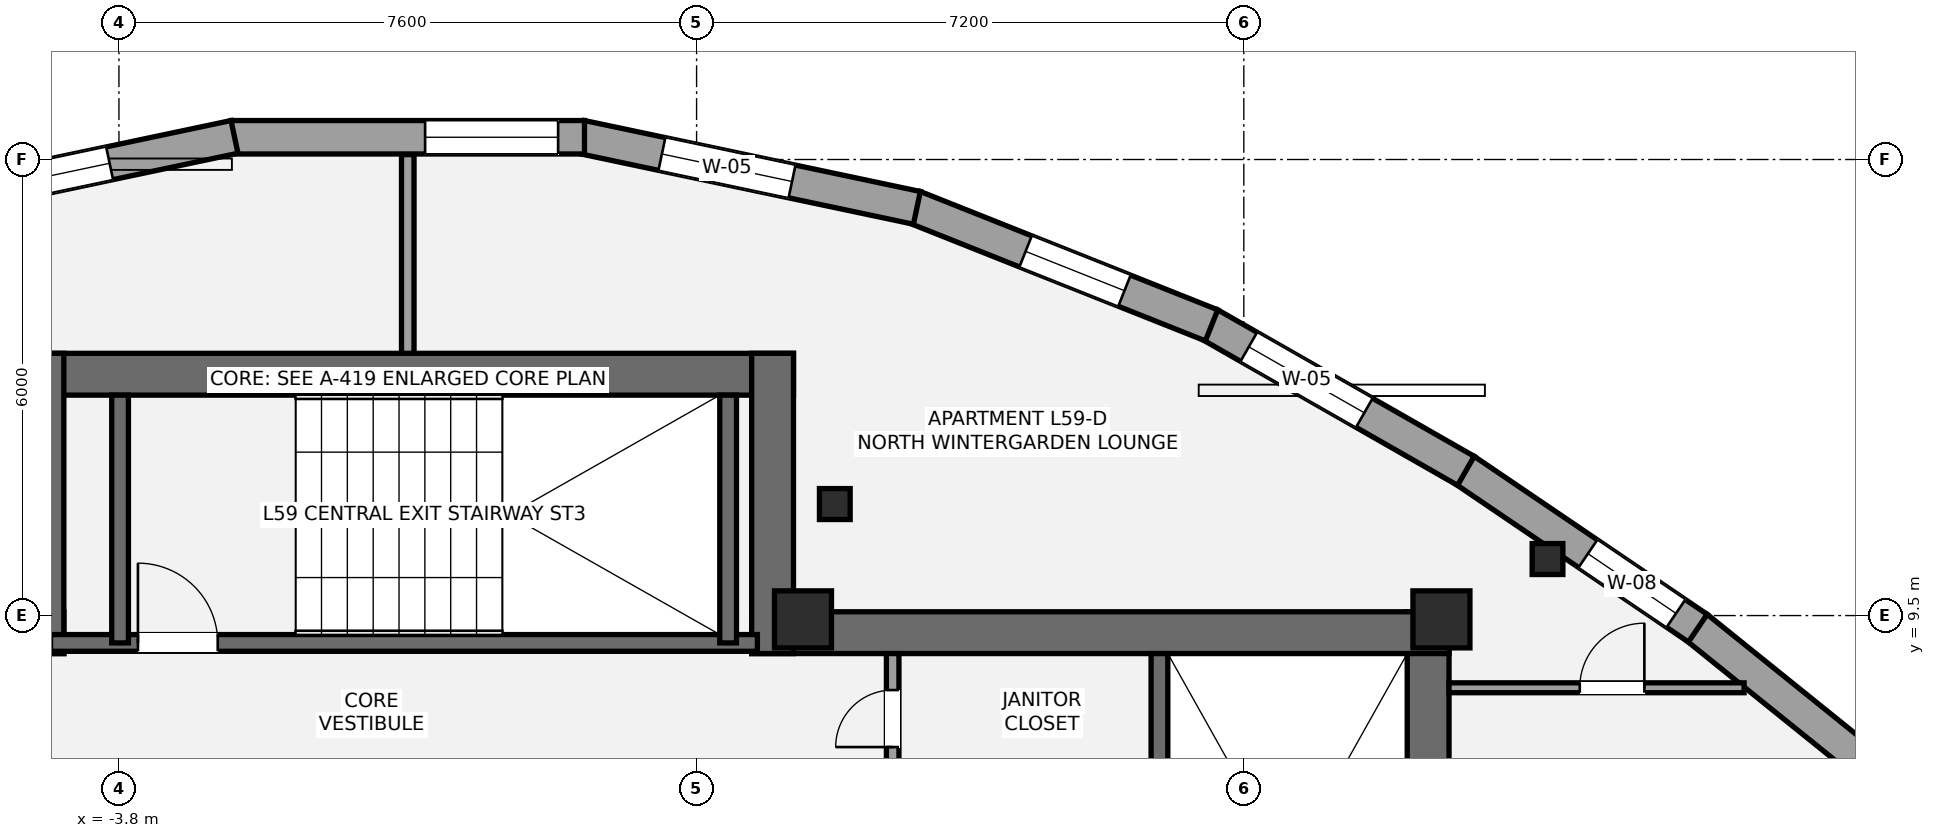
"""IFC4 building model, lengths in metres.
Left out: names, types, materials, properties, quantities, classifications, styles, units other than length and angle.
Written with IfcOpenShell. Run it as: python <this file> out.ifc"""

import sys

from ifc_helpers import new_model, si_unit, direction, frame, frame_2d, origin, origin_2d, place, context, subcontext, project, spatial, rectangle, i_section, extrude, element, fill, save


model = new_model("IFC4")
c1 = context("Model", 3, precision=1e-05, world=origin(), true_north=direction((0.0, 1.0)))
c2 = subcontext(c1, "Body", "Model", "MODEL_VIEW")
j1 = project(units=[si_unit("LENGTHUNIT", "METRE"), si_unit("PLANEANGLEUNIT", "RADIAN")], contexts=[c1])
p1 = place(None, origin())
s1 = spatial("IfcSite", under=j1, at=p1, CompositionType="ELEMENT")
p2 = place(p1, origin())
s2 = spatial("IfcBuilding", under=s1, at=p2, CompositionType="ELEMENT")
p3 = place(p2, frame((0.0, 0.0, 213.15)))
s3 = spatial("IfcBuildingStorey", under=s2, at=p3, CompositionType="ELEMENT", Elevation=213.15)
p4 = place(p3, frame((-13.7, 9.275, 0.0), z_axis=(0.0, 0.0, 1.0), x_axis=(1.0, 0.0, 0.0)))
e1 = element("IfcWall", 1, at=p4, inside=s3, PredefinedType="SHEAR", context=c2, shape_type="SweptSolid", body=[
    extrude(rectangle(XDim=9.175, YDim=0.55, at=frame_2d((4.587, 0.0))), origin(), (0.0, 0.0, 1.0), 3.15),
])
p5 = place(p3, frame((13.425, 1.3, 0.0), z_axis=(0.0, 0.0, 1.0), x_axis=(0.0, 1.0, 0.0)))
e2 = element("IfcWall", 2, at=p5, inside=s3, PredefinedType="SHEAR", context=c2, shape_type="SweptSolid", body=[
    extrude(rectangle(XDim=8.25, YDim=0.55, at=frame_2d((4.125, 0.0))), origin(), (0.0, 0.0, 1.0), 3.15),
])
p6 = place(p3, frame((4.525, 9.275, 0.0), z_axis=(0.0, 0.0, 1.0), x_axis=(1.0, 0.0, 0.0)))
e3 = element("IfcWall", 3, at=p6, inside=s3, PredefinedType="SHEAR", context=c2, shape_type="SweptSolid", body=[
    extrude(rectangle(XDim=9.175, YDim=0.55, at=frame_2d((4.587, 0.0))), origin(), (0.0, 0.0, 1.0), 3.15),
])
p7 = place(p3, frame((9.89, 1.85, 0.0), z_axis=(0.0, 0.0, 1.0), x_axis=(0.0, 1.0, 0.0)))
e4 = element("IfcWall", 4, at=p7, inside=s3, PredefinedType="SHEAR", context=c2, shape_type="SweptSolid", body=[
    extrude(rectangle(XDim=7.15, YDim=0.22, at=frame_2d((3.575, 0.0))), origin(), (0.0, 0.0, 1.0), 3.15),
])
p8 = place(p3, frame((-5.075, 12.675, 0.0), z_axis=(0.0, 0.0, 1.0), x_axis=(1.0, 0.0, 0.0)))
e5 = element("IfcWall", 5, at=p8, inside=s3, PredefinedType="SHEAR", context=c2, shape_type="SweptSolid", body=[
    extrude(rectangle(XDim=10.15, YDim=0.55, at=frame_2d((5.075, 0.0))), origin(), (0.0, 0.0, 1.0), 3.15),
])
for number, where, z_axis, x_axis in (
    (6, (-4.8, 9.0, 0.0), (0.0, 0.0, 1.0), (0.0, 1.0, 0.0)),
    (7, (4.8, 9.0, 0.0), (0.0, 0.0, 1.0), (0.0, 1.0, 0.0)),
):
    element("IfcWall", number, at=place(p3, frame(where, z_axis=z_axis, x_axis=x_axis)), inside=s3, PredefinedType="SHEAR", context=c2, shape_type="SweptSolid", body=[
        extrude(rectangle(XDim=3.95, YDim=0.55, at=frame_2d((1.975, 0.0))), origin(), (0.0, 0.0, 1.0), 3.15),
    ])
p9 = place(p3, frame((-4.7, 9.14, 0.0), z_axis=(0.0, 0.0, 1.0), x_axis=(1.0, 0.0, 0.0)))
e8 = element("IfcWall", 8, at=p9, inside=s3, PredefinedType="SHEAR", context=c2, shape_type="SweptSolid", body=[
    extrude(rectangle(XDim=9.3, YDim=0.22, at=frame_2d((4.65, 0.0))), origin(), (0.0, 0.0, 1.0), 3.15),
])
p10 = place(p9, frame((1.15, 0.0, 0.0)))
e9 = element("IfcOpeningElement", 9, at=p10, cuts=e8, PredefinedType="OPENING", context=c2, shape_type="SweptSolid", body=[
    extrude(rectangle(XDim=1.05, YDim=2.15, at=frame_2d((0.525, 1.075))), frame((0.0, 0.12, 0.0), z_axis=(0.0, -1.0, 0.0), x_axis=(1.0, 0.0, 0.0)), (0.0, 0.0, 1.0), 0.24),
])
for number, where, z_axis, x_axis in (
    (10, (-3.785, 9.14, 0.0), (0.0, 0.0, 1.0), (0.0, 1.0, 0.0)),
    (11, (4.215, 9.14, 0.0), (0.0, 0.0, 1.0), (0.0, 1.0, 0.0)),
):
    element("IfcWall", number, at=place(p3, frame(where, z_axis=z_axis, x_axis=x_axis)), inside=s3, PredefinedType="SHEAR", context=c2, shape_type="SweptSolid", body=[
        extrude(rectangle(XDim=3.26, YDim=0.22, at=frame_2d((1.63, 0.0))), origin(), (0.0, 0.0, 1.0), 3.15),
    ])
for number, where, z_axis, x_axis in (
    (12, (5.2, 9.45, 0.0), (0.0, 0.0, 1.0), (1.0, 0.0, 0.0)),
    (13, (13.6, 9.45, 0.0), (0.0, 0.0, 1.0), (1.0, 0.0, 0.0)),
):
    element("IfcColumn", number, at=place(p3, frame(where, z_axis=z_axis, x_axis=x_axis)), inside=s3, PredefinedType="PILASTER", context=c2, shape_type="SweptSolid", body=[
        extrude(rectangle(XDim=0.75, YDim=0.75, at=origin_2d()), origin(), (0.0, 0.0, 1.0), 3.15),
    ])
for number, where, z_axis, x_axis in (
    (14, (14.996, 10.244, 0.0), (0.0, 0.0, 1.0), (1.0, 0.0, 0.0)),
    (15, (5.619, 10.967, 0.0), (0.0, 0.0, 1.0), (1.0, 0.0, 0.0)),
):
    element("IfcColumn", number, at=place(p3, frame(where, z_axis=z_axis, x_axis=x_axis)), inside=s3, PredefinedType="COLUMN", context=c2, shape_type="SweptSolid", body=[
        extrude(i_section(OverallWidth=0.404, OverallDepth=0.407, WebThickness=0.027, FlangeThickness=0.044, at=origin_2d()), origin(), (0.0, 0.0, 1.0), 3.15),
    ])
p11 = place(p3, frame((16.958, 9.345, 0.0), z_axis=(0.0, 0.0, 1.0), x_axis=(0.778794775864, -0.627278803314, 0.0)))
e16 = element("IfcWall", 16, at=p11, inside=s3, PredefinedType="STANDARD", context=c2, shape_type="SweptSolid", body=[
    extrude(rectangle(XDim=3.648, YDim=0.44, at=frame_2d((1.824, 0.0))), origin(), (0.0, 0.0, 1.0), 2.336),
])
p12 = place(p3, frame((13.907, 11.413, 0.0), z_axis=(0.0, 0.0, 1.0), x_axis=(0.827592777121, -0.561328954586, 0.0)))
e17 = element("IfcWall", 17, at=p12, inside=s3, PredefinedType="STANDARD", context=c2, shape_type="SweptSolid", body=[
    extrude(rectangle(XDim=3.704, YDim=0.44, at=frame_2d((1.852, 0.0))), origin(), (0.0, 0.0, 1.0), 2.336),
])
p13 = place(p12, frame((1.958, 0.0, 0.58)))
e18 = element("IfcOpeningElement", 18, at=p13, cuts=e17, PredefinedType="OPENING", context=c2, shape_type="SweptSolid", body=[
    extrude(rectangle(XDim=1.4, YDim=1.55, at=frame_2d((0.7, 0.775))), frame((0.0, 0.23, 0.0), z_axis=(0.0, -1.0, 0.0), x_axis=(1.0, 0.0, 0.0)), (0.0, 0.0, 1.0), 0.46),
])
p14 = place(p3, frame((10.548, 13.332, 0.0), z_axis=(0.0, 0.0, 1.0), x_axis=(0.868339797426, -0.495969753317, 0.0)))
e19 = element("IfcWall", 19, at=p14, inside=s3, PredefinedType="STANDARD", context=c2, shape_type="SweptSolid", body=[
    extrude(rectangle(XDim=3.885, YDim=0.44, at=frame_2d((1.943, 0.0))), origin(), (0.0, 0.0, 1.0), 2.336),
])
p15 = place(p14, frame((0.597, 0.0, 0.55)))
e20 = element("IfcOpeningElement", 20, at=p15, cuts=e19, PredefinedType="OPENING", context=c2, shape_type="SweptSolid", body=[
    extrude(rectangle(XDim=1.75, YDim=1.55, at=frame_2d((0.875, 0.775))), frame((0.0, 0.23, 0.0), z_axis=(0.0, -1.0, 0.0), x_axis=(1.0, 0.0, 0.0)), (0.0, 0.0, 1.0), 0.46),
])
p16 = place(p3, frame((6.663, 14.875, 0.0), z_axis=(0.0, 0.0, 1.0), x_axis=(0.929170765931, -0.369650764558, 0.0)))
e21 = element("IfcWall", 21, at=p16, inside=s3, PredefinedType="STANDARD", context=c2, shape_type="SweptSolid", body=[
    extrude(rectangle(XDim=4.211, YDim=0.44, at=frame_2d((2.105, 0.0))), origin(), (0.0, 0.0, 1.0), 2.336),
])
p17 = place(p16, frame((1.578, 0.0, 0.55)))
e22 = element("IfcOpeningElement", 22, at=p17, cuts=e21, PredefinedType="OPENING", context=c2, shape_type="SweptSolid", body=[
    extrude(rectangle(XDim=1.4, YDim=1.55, at=frame_2d((0.7, 0.775))), frame((0.0, 0.23, 0.0), z_axis=(0.0, -1.0, 0.0), x_axis=(1.0, 0.0, 0.0)), (0.0, 0.0, 1.0), 0.46),
])
p18 = place(p3, frame((2.28, 15.798, 0.0), z_axis=(0.0, 0.0, 1.0), x_axis=(0.97840271225, -0.206707843737, 0.0)))
e23 = element("IfcWall", 23, at=p18, inside=s3, PredefinedType="STANDARD", context=c2, shape_type="SweptSolid", body=[
    extrude(rectangle(XDim=4.517, YDim=0.44, at=frame_2d((2.258, 0.0))), origin(), (0.0, 0.0, 1.0), 2.336),
])
p19 = place(p18, frame((1.087, 0.0, 0.55)))
e24 = element("IfcOpeningElement", 24, at=p19, cuts=e23, PredefinedType="OPENING", context=c2, shape_type="SweptSolid", body=[
    extrude(rectangle(XDim=1.75, YDim=1.55, at=frame_2d((0.875, 0.775))), frame((0.0, 0.23, 0.0), z_axis=(0.0, -1.0, 0.0), x_axis=(1.0, 0.0, 0.0)), (0.0, 0.0, 1.0), 0.46),
])
p20 = place(p3, frame((-2.325, 15.793, 0.0), z_axis=(0.0, 0.0, 1.0), x_axis=(1.0, 0.0, 0.0)))
e25 = element("IfcWall", 25, at=p20, inside=s3, PredefinedType="STANDARD", context=c2, shape_type="SweptSolid", body=[
    extrude(rectangle(XDim=4.65, YDim=0.44, at=frame_2d((2.325, 0.0))), origin(), (0.0, 0.0, 1.0), 2.336),
])
p21 = place(p20, frame((2.553, 0.0, 0.55)))
e26 = element("IfcOpeningElement", 26, at=p21, cuts=e25, PredefinedType="OPENING", context=c2, shape_type="SweptSolid", body=[
    extrude(rectangle(XDim=1.75, YDim=1.55, at=frame_2d((0.875, 0.775))), frame((0.0, 0.23, 0.0), z_axis=(0.0, -1.0, 0.0), x_axis=(1.0, 0.0, 0.0)), (0.0, 0.0, 1.0), 0.46),
])
p22 = place(p3, frame((-6.699, 14.864, 0.0), z_axis=(0.0, 0.0, 1.0), x_axis=(0.97840271225, 0.206707843737, 0.0)))
e27 = element("IfcWall", 27, at=p22, inside=s3, PredefinedType="STANDARD", context=c2, shape_type="SweptSolid", body=[
    extrude(rectangle(XDim=4.517, YDim=0.44, at=frame_2d((2.258, 0.0))), origin(), (0.0, 0.0, 1.0), 2.336),
])
p23 = place(p22, frame((1.087, 0.0, 0.55)))
e28 = element("IfcOpeningElement", 28, at=p23, cuts=e27, PredefinedType="OPENING", context=c2, shape_type="SweptSolid", body=[
    extrude(rectangle(XDim=1.75, YDim=1.55, at=frame_2d((0.875, 0.775))), frame((0.0, 0.23, 0.0), z_axis=(0.0, -1.0, 0.0), x_axis=(1.0, 0.0, 0.0)), (0.0, 0.0, 1.0), 0.46),
])
p24 = place(p3, frame((6.38, 7.42, 0.0), z_axis=(0.0, 0.0, 1.0), x_axis=(0.0, 1.0, 0.0)))
e29 = element("IfcWall", 29, at=p24, inside=s3, PredefinedType="PARTITIONING", context=c2, shape_type="SweptSolid", body=[
    extrude(rectangle(XDim=1.58, YDim=0.165, at=frame_2d((0.79, 0.0))), origin(), (0.0, 0.0, 1.0), 2.97),
])
p25 = place(p24, frame((0.35, 0.0, 0.0)))
e30 = element("IfcOpeningElement", 30, at=p25, cuts=e29, PredefinedType="OPENING", context=c2, shape_type="SweptSolid", body=[
    extrude(rectangle(XDim=0.75, YDim=2.1, at=frame_2d((0.375, 1.05))), frame((0.0, 0.093, 0.0), z_axis=(0.0, -1.0, 0.0), x_axis=(1.0, 0.0, 0.0)), (0.0, 0.0, 1.0), 0.185),
])
p26 = place(p3, frame((0.0, 12.95, 0.0), z_axis=(0.0, 0.0, 1.0), x_axis=(0.0, 1.0, 0.0)))
e31 = element("IfcWall", 31, at=p26, inside=s3, PredefinedType="PARTITIONING", context=c2, shape_type="SweptSolid", body=[
    extrude(rectangle(XDim=2.615, YDim=0.165, at=frame_2d((1.307, 0.0))), origin(), (0.0, 0.0, 1.0), 2.97),
])
p27 = place(p3, frame((13.7, 8.55, 0.0), z_axis=(0.0, 0.0, 1.0), x_axis=(1.0, 0.0, 0.0)))
e32 = element("IfcWall", 32, at=p27, inside=s3, PredefinedType="PARTITIONING", context=c2, shape_type="SweptSolid", body=[
    extrude(rectangle(XDim=3.882, YDim=0.13, at=frame_2d((1.941, 0.0))), origin(), (0.0, 0.0, 1.0), 2.423),
])
p28 = place(p27, frame((1.72, 0.0, 0.0)))
e33 = element("IfcOpeningElement", 33, at=p28, cuts=e32, PredefinedType="OPENING", context=c2, shape_type="SweptSolid", body=[
    extrude(rectangle(XDim=0.85, YDim=2.1, at=frame_2d((0.425, 1.05))), frame((0.0, 0.075, 0.0), z_axis=(0.0, -1.0, 0.0), x_axis=(1.0, 0.0, 0.0)), (0.0, 0.0, 1.0), 0.15),
])
p29 = place(p13, origin())
e34 = element("IfcWindow", 34, at=p29, inside=s3, PartitioningType="SINGLE_PANEL", PredefinedType="WINDOW", context=c2, shape_type="SweptSolid", body=[
    extrude(rectangle(XDim=1.4, YDim=1.55, at=frame_2d((0.7, 0.775))), frame((0.0, -0.01, 0.0), z_axis=(0.0, -1.0, 0.0), x_axis=(1.0, 0.0, 0.0)), (0.0, 0.0, 1.0), 0.06),
])
fill(e18, e34)
p30 = place(p15, origin())
e35 = element("IfcWindow", 35, at=p30, inside=s3, PartitioningType="SINGLE_PANEL", PredefinedType="WINDOW", context=c2, shape_type="SweptSolid", body=[
    extrude(rectangle(XDim=1.75, YDim=1.55, at=frame_2d((0.875, 0.775))), frame((0.0, -0.01, 0.0), z_axis=(0.0, -1.0, 0.0), x_axis=(1.0, 0.0, 0.0)), (0.0, 0.0, 1.0), 0.06),
])
fill(e20, e35)
p31 = place(p17, origin())
e36 = element("IfcWindow", 36, at=p31, inside=s3, PartitioningType="SINGLE_PANEL", PredefinedType="WINDOW", context=c2, shape_type="SweptSolid", body=[
    extrude(rectangle(XDim=1.4, YDim=1.55, at=frame_2d((0.7, 0.775))), frame((0.0, -0.01, 0.0), z_axis=(0.0, -1.0, 0.0), x_axis=(1.0, 0.0, 0.0)), (0.0, 0.0, 1.0), 0.06),
])
fill(e22, e36)
p32 = place(p19, origin())
e37 = element("IfcWindow", 37, at=p32, inside=s3, PartitioningType="SINGLE_PANEL", PredefinedType="WINDOW", context=c2, shape_type="SweptSolid", body=[
    extrude(rectangle(XDim=1.75, YDim=1.55, at=frame_2d((0.875, 0.775))), frame((0.0, -0.01, 0.0), z_axis=(0.0, -1.0, 0.0), x_axis=(1.0, 0.0, 0.0)), (0.0, 0.0, 1.0), 0.06),
])
fill(e24, e37)
p33 = place(p21, origin())
e38 = element("IfcWindow", 38, at=p33, inside=s3, PartitioningType="SINGLE_PANEL", PredefinedType="WINDOW", context=c2, shape_type="SweptSolid", body=[
    extrude(rectangle(XDim=1.75, YDim=1.55, at=frame_2d((0.875, 0.775))), frame((0.0, -0.01, 0.0), z_axis=(0.0, -1.0, 0.0), x_axis=(1.0, 0.0, 0.0)), (0.0, 0.0, 1.0), 0.06),
])
fill(e26, e38)
p34 = place(p23, origin())
e39 = element("IfcWindow", 39, at=p34, inside=s3, PartitioningType="SINGLE_PANEL", PredefinedType="WINDOW", context=c2, shape_type="SweptSolid", body=[
    extrude(rectangle(XDim=1.75, YDim=1.55, at=frame_2d((0.875, 0.775))), frame((0.0, -0.01, 0.0), z_axis=(0.0, -1.0, 0.0), x_axis=(1.0, 0.0, 0.0)), (0.0, 0.0, 1.0), 0.06),
])
fill(e28, e39)
p35 = place(p10, origin())
e40 = element("IfcDoor", 40, at=p35, inside=s3, OperationType="SINGLE_SWING_LEFT", PredefinedType="DOOR", context=c2, shape_type="SweptSolid", body=[
    extrude(rectangle(XDim=1.05, YDim=2.15, at=frame_2d((0.525, 1.075))), frame((0.0, 0.025, 0.0), z_axis=(0.0, -1.0, 0.0), x_axis=(1.0, 0.0, 0.0)), (0.0, 0.0, 1.0), 0.05),
])
fill(e9, e40)
p36 = place(p25, origin())
e41 = element("IfcDoor", 41, at=p36, inside=s3, OperationType="SINGLE_SWING_LEFT", PredefinedType="DOOR", context=c2, shape_type="SweptSolid", body=[
    extrude(rectangle(XDim=0.75, YDim=2.1, at=frame_2d((0.375, 1.05))), frame((0.0, 0.025, 0.0), z_axis=(0.0, -1.0, 0.0), x_axis=(1.0, 0.0, 0.0)), (0.0, 0.0, 1.0), 0.05),
])
fill(e30, e41)
p37 = place(p28, origin())
e42 = element("IfcDoor", 42, at=p37, inside=s3, OperationType="SINGLE_SWING_RIGHT", PredefinedType="DOOR", context=c2, shape_type="SweptSolid", body=[
    extrude(rectangle(XDim=0.85, YDim=2.1, at=frame_2d((0.425, 1.05))), frame((0.0, 0.025, 0.0), z_axis=(0.0, -1.0, 0.0), x_axis=(1.0, 0.0, 0.0)), (0.0, 0.0, 1.0), 0.05),
])
fill(e33, e42)
save(model, sys.argv[1])
